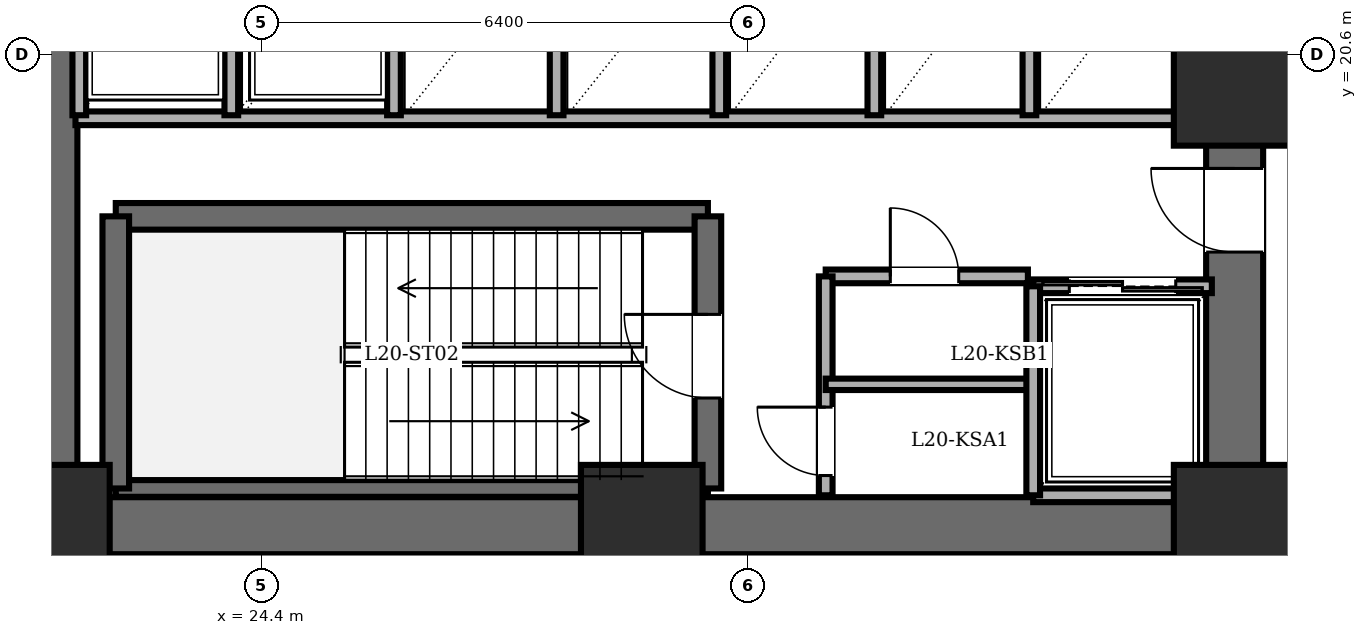
"""IFC4 building model, lengths in metres.
Left out: names, types, materials, properties, quantities, classifications, styles, units other than length and angle.
Written with IfcOpenShell. Run it as: python <this file> out.ifc"""

import sys

from ifc_helpers import new_model, si_unit, direction, frame, frame_2d, origin, origin_2d, place, context, subcontext, project, spatial, rectangle, extrude, element, fill, save


model = new_model("IFC4")
c1 = context("Model", 3, precision=1e-05, world=origin(), true_north=direction((0.0, 1.0)))
c2 = subcontext(c1, "Body", "Model", "MODEL_VIEW")
j1 = project(units=[si_unit("LENGTHUNIT", "METRE"), si_unit("PLANEANGLEUNIT", "RADIAN")], contexts=[c1])
p1 = place(None, origin())
s1 = spatial("IfcSite", under=j1, at=p1, CompositionType="ELEMENT")
p2 = place(p1, origin())
s2 = spatial("IfcBuilding", under=s1, at=p2, CompositionType="ELEMENT")
p3 = place(p2, frame((0.0, 0.0, 75.6)))
s3 = spatial("IfcBuildingStorey", under=s2, at=p3, CompositionType="ELEMENT", Elevation=75.6)
for number, where, z_axis, x_axis in (
    (1, (21.6, 14.4, 0.0), (0.0, 0.0, 1.0), (1.0, 0.0, 0.0)),
    (2, (29.4, 14.4, 0.0), (0.0, 0.0, 1.0), (1.0, 0.0, 0.0)),
    (3, (37.2, 14.4, 0.0), (0.0, 0.0, 1.0), (1.0, 0.0, 0.0)),
    (4, (37.2, 20.2, 0.0), (0.0, 0.0, 1.0), (1.0, 0.0, 0.0)),
):
    element("IfcColumn", number, at=place(p3, frame(where, z_axis=z_axis, x_axis=x_axis)), inside=s3, PredefinedType="COLUMN", context=c2, shape_type="SweptSolid", body=[
        extrude(rectangle(XDim=1.6, YDim=1.6, at=origin_2d()), origin(), (0.0, 0.0, 1.0), 5.6),
    ])
p4 = place(p3, frame((21.6, 14.4, 0.0), z_axis=(0.0, 0.0, 1.0), x_axis=(0.0, 1.0, 0.0)))
e5 = element("IfcWall", 5, at=p4, inside=s3, PredefinedType="SHEAR", context=c2, shape_type="SweptSolid", body=[
    extrude(rectangle(XDim=19.2, YDim=0.75, at=frame_2d((9.6, 0.0))), origin(), (0.0, 0.0, 1.0), 5.36),
])
p5 = place(p3, frame((37.2, 14.4, 0.0), z_axis=(0.0, 0.0, 1.0), x_axis=(-1.0, 0.0, 0.0)))
e6 = element("IfcWall", 6, at=p5, inside=s3, PredefinedType="SHEAR", context=c2, shape_type="SweptSolid", body=[
    extrude(rectangle(XDim=15.6, YDim=0.75, at=frame_2d((7.8, 0.0))), origin(), (0.0, 0.0, 1.0), 5.36),
])
p6 = place(p3, frame((37.2, 14.4, 0.0), z_axis=(0.0, 0.0, 1.0), x_axis=(0.0, 1.0, 0.0)))
e7 = element("IfcWall", 7, at=p6, inside=s3, PredefinedType="SHEAR", context=c2, shape_type="SweptSolid", body=[
    extrude(rectangle(XDim=19.2, YDim=0.75, at=frame_2d((9.6, 0.0))), origin(), (0.0, 0.0, 1.0), 5.36),
])
p7 = place(p6, frame((15.8, 0.0, 0.0)))
e8 = element("IfcOpeningElement", 8, at=p7, cuts=e7, PredefinedType="OPENING", context=c2, shape_type="SweptSolid", body=[
    extrude(rectangle(XDim=1.15, YDim=2.15, at=frame_2d((0.575, 1.075))), frame((0.0, 0.385, 0.0), z_axis=(0.0, -1.0, 0.0), x_axis=(1.0, 0.0, 0.0)), (0.0, 0.0, 1.0), 0.77),
])
p8 = place(p6, frame((3.6, 0.0, 0.0)))
e9 = element("IfcOpeningElement", 9, at=p8, cuts=e7, PredefinedType="OPENING", context=c2, shape_type="SweptSolid", body=[
    extrude(rectangle(XDim=1.1, YDim=2.15, at=frame_2d((0.55, 1.075))), frame((0.0, 0.385, 0.0), z_axis=(0.0, -1.0, 0.0), x_axis=(1.0, 0.0, 0.0)), (0.0, 0.0, 1.0), 0.77),
])
p9 = place(p6, frame((8.6, 0.0, 0.0)))
e10 = element("IfcOpeningElement", 10, at=p9, cuts=e7, PredefinedType="OPENING", context=c2, shape_type="SweptSolid", body=[
    extrude(rectangle(XDim=1.3, YDim=2.2, at=frame_2d((0.65, 1.1))), frame((0.0, 0.385, 0.0), z_axis=(0.0, -1.0, 0.0), x_axis=(1.0, 0.0, 0.0)), (0.0, 0.0, 1.0), 0.77),
])
p10 = place(p3, frame((22.48, 18.47, 0.0), z_axis=(0.0, 0.0, 1.0), x_axis=(1.0, 0.0, 0.0)))
e11 = element("IfcWall", 11, at=p10, inside=s3, PredefinedType="SOLIDWALL", context=c2, shape_type="SweptSolid", body=[
    extrude(rectangle(XDim=7.79, YDim=0.35, at=frame_2d((3.895, 0.0))), origin(), (0.0, 0.0, 1.0), 5.36),
])
p11 = place(p3, frame((22.48, 14.89, 0.0), z_axis=(0.0, 0.0, 1.0), x_axis=(1.0, 0.0, 0.0)))
e12 = element("IfcWall", 12, at=p11, inside=s3, PredefinedType="PARTITIONING", context=c2, shape_type="SweptSolid", body=[
    extrude(rectangle(XDim=7.79, YDim=0.22, at=frame_2d((3.895, 0.0))), origin(), (0.0, 0.0, 1.0), 5.36),
])
p12 = place(p3, frame((22.48, 14.89, 0.0), z_axis=(0.0, 0.0, 1.0), x_axis=(0.0, 1.0, 0.0)))
e13 = element("IfcWall", 13, at=p12, inside=s3, PredefinedType="SOLIDWALL", context=c2, shape_type="SweptSolid", body=[
    extrude(rectangle(XDim=3.58, YDim=0.35, at=frame_2d((1.79, 0.0))), origin(), (0.0, 0.0, 1.0), 5.36),
])
p13 = place(p3, frame((30.27, 14.89, 0.0), z_axis=(0.0, 0.0, 1.0), x_axis=(0.0, 1.0, 0.0)))
e14 = element("IfcWall", 14, at=p13, inside=s3, PredefinedType="SOLIDWALL", context=c2, shape_type="SweptSolid", body=[
    extrude(rectangle(XDim=3.58, YDim=0.35, at=frame_2d((1.79, 0.0))), origin(), (0.0, 0.0, 1.0), 5.36),
])
p14 = place(p13, frame((1.19, 0.0, 0.0)))
e15 = element("IfcOpeningElement", 15, at=p14, cuts=e14, PredefinedType="OPENING", context=c2, shape_type="SweptSolid", body=[
    extrude(rectangle(XDim=1.1, YDim=2.15, at=frame_2d((0.55, 1.075))), frame((0.0, 0.185, 0.0), z_axis=(0.0, -1.0, 0.0), x_axis=(1.0, 0.0, 0.0)), (0.0, 0.0, 1.0), 0.37),
])
p15 = place(p3, frame((21.95, 19.76, 0.0), z_axis=(0.0, 0.0, 1.0), x_axis=(1.0, 0.0, 0.0)))
e16 = element("IfcWall", 16, at=p15, inside=s3, PredefinedType="PARTITIONING", context=c2, shape_type="SweptSolid", body=[
    extrude(rectangle(XDim=14.87, YDim=0.18, at=frame_2d((7.435, 0.0))), origin(), (0.0, 0.0, 1.0), 5.36),
])
p16 = place(p3, frame((31.82, 17.68, 0.0), z_axis=(0.0, 0.0, 1.0), x_axis=(1.0, 0.0, 0.0)))
e17 = element("IfcWall", 17, at=p16, inside=s3, PredefinedType="PARTITIONING", context=c2, shape_type="SweptSolid", body=[
    extrude(rectangle(XDim=2.66, YDim=0.18, at=frame_2d((1.33, 0.0))), origin(), (0.0, 0.0, 1.0), 5.36),
])
p17 = place(p16, frame((0.85, 0.0, 0.0)))
e18 = element("IfcOpeningElement", 18, at=p17, cuts=e17, PredefinedType="OPENING", context=c2, shape_type="SweptSolid", body=[
    extrude(rectangle(XDim=0.9, YDim=2.05, at=frame_2d((0.45, 1.025))), frame((0.0, 0.1, 0.0), z_axis=(0.0, -1.0, 0.0), x_axis=(1.0, 0.0, 0.0)), (0.0, 0.0, 1.0), 0.2),
])
p18 = place(p3, frame((31.82, 14.8, 0.0), z_axis=(0.0, 0.0, 1.0), x_axis=(0.0, 1.0, 0.0)))
e19 = element("IfcWall", 19, at=p18, inside=s3, PredefinedType="PARTITIONING", context=c2, shape_type="SweptSolid", body=[
    extrude(rectangle(XDim=2.88, YDim=0.18, at=frame_2d((1.44, 0.0))), origin(), (0.0, 0.0, 1.0), 5.36),
])
p19 = place(p18, frame((0.26, 0.0, 0.0)))
e20 = element("IfcOpeningElement", 20, at=p19, cuts=e19, PredefinedType="OPENING", context=c2, shape_type="SweptSolid", body=[
    extrude(rectangle(XDim=0.9, YDim=2.05, at=frame_2d((0.45, 1.025))), frame((0.0, 0.1, 0.0), z_axis=(0.0, -1.0, 0.0), x_axis=(1.0, 0.0, 0.0)), (0.0, 0.0, 1.0), 0.2),
])
p20 = place(p3, frame((31.82, 16.26, 0.0), z_axis=(0.0, 0.0, 1.0), x_axis=(1.0, 0.0, 0.0)))
e21 = element("IfcWall", 21, at=p20, inside=s3, PredefinedType="PARTITIONING", context=c2, shape_type="SweptSolid", body=[
    extrude(rectangle(XDim=2.66, YDim=0.15, at=frame_2d((1.33, 0.0))), origin(), (0.0, 0.0, 1.0), 5.36),
])
p21 = place(p3, frame((34.55, 17.55, 0.0), z_axis=(0.0, 0.0, 1.0), x_axis=(1.0, 0.0, 0.0)))
e22 = element("IfcWall", 22, at=p21, inside=s3, PredefinedType="PARTITIONING", context=c2, shape_type="SweptSolid", body=[
    extrude(rectangle(XDim=2.35, YDim=0.18, at=frame_2d((1.175, 0.0))), origin(), (0.0, 0.0, 1.0), 5.36),
])
p22 = place(p21, frame((0.475, 0.0, 0.0)))
e23 = element("IfcOpeningElement", 23, at=p22, cuts=e22, PredefinedType="OPENING", context=c2, shape_type="SweptSolid", body=[
    extrude(rectangle(XDim=1.4, YDim=2.3, at=frame_2d((0.7, 1.15))), frame((0.0, 0.1, 0.0), z_axis=(0.0, -1.0, 0.0), x_axis=(1.0, 0.0, 0.0)), (0.0, 0.0, 1.0), 0.2),
])
p23 = place(p3, frame((36.9, 14.8, 0.0), z_axis=(0.0, 0.0, 1.0), x_axis=(-1.0, 0.0, 0.0)))
e24 = element("IfcWall", 24, at=p23, inside=s3, PredefinedType="PARTITIONING", context=c2, shape_type="SweptSolid", body=[
    extrude(rectangle(XDim=2.35, YDim=0.18, at=frame_2d((1.175, 0.0))), origin(), (0.0, 0.0, 1.0), 2.942),
])
p24 = place(p3, frame((34.55, 17.55, 0.0), z_axis=(0.0, 0.0, 1.0), x_axis=(0.0, -1.0, 0.0)))
e25 = element("IfcWall", 25, at=p24, inside=s3, PredefinedType="PARTITIONING", context=c2, shape_type="SweptSolid", body=[
    extrude(rectangle(XDim=2.75, YDim=0.18, at=frame_2d((1.375, 0.0))), origin(), (0.0, 0.0, 1.0), 5.36),
])
for number, where, z_axis, x_axis in (
    (26, (24.0, 19.8, 0.0), (0.0, 0.0, 1.0), (0.0, 1.0, 0.0)),
    (27, (22.0, 22.3, 0.0), (0.0, 0.0, 1.0), (0.0, -1.0, 0.0)),
    (28, (26.14, 19.8, 0.0), (0.0, 0.0, 1.0), (0.0, 1.0, 0.0)),
    (29, (28.28, 19.8, 0.0), (0.0, 0.0, 1.0), (0.0, 1.0, 0.0)),
    (30, (30.42, 19.8, 0.0), (0.0, 0.0, 1.0), (0.0, 1.0, 0.0)),
    (31, (32.46, 19.8, 0.0), (0.0, 0.0, 1.0), (0.0, 1.0, 0.0)),
    (32, (34.5, 19.8, 0.0), (0.0, 0.0, 1.0), (0.0, 1.0, 0.0)),
    (33, (36.54, 19.8, 0.0), (0.0, 0.0, 1.0), (0.0, 1.0, 0.0)),
):
    element("IfcWall", number, at=place(p3, frame(where, z_axis=z_axis, x_axis=x_axis)), inside=s3, PredefinedType="PARTITIONING", context=c2, shape_type="SweptSolid", body=[
        extrude(rectangle(XDim=2.5, YDim=0.18, at=frame_2d((1.25, 0.0))), origin(), (0.0, 0.0, 1.0), 5.36),
    ])
p25 = place(p14, origin())
e34 = element("IfcDoor", 34, at=p25, inside=s3, OperationType="SINGLE_SWING_RIGHT", PredefinedType="DOOR", context=c2, shape_type="SweptSolid", body=[
    extrude(rectangle(XDim=1.1, YDim=2.15, at=frame_2d((0.55, 1.075))), frame((0.0, 0.025, 0.0), z_axis=(0.0, -1.0, 0.0), x_axis=(1.0, 0.0, 0.0)), (0.0, 0.0, 1.0), 0.05),
])
fill(e15, e34)
p26 = place(p8, origin())
e35 = element("IfcDoor", 35, at=p26, inside=s3, OperationType="SINGLE_SWING_RIGHT", PredefinedType="DOOR", context=c2, shape_type="SweptSolid", body=[
    extrude(rectangle(XDim=1.1, YDim=2.15, at=frame_2d((0.55, 1.075))), frame((0.0, 0.025, 0.0), z_axis=(0.0, -1.0, 0.0), x_axis=(1.0, 0.0, 0.0)), (0.0, 0.0, 1.0), 0.05),
])
fill(e9, e35)
p27 = place(p17, origin())
e36 = element("IfcDoor", 36, at=p27, inside=s3, OperationType="SINGLE_SWING_LEFT", PredefinedType="DOOR", context=c2, shape_type="SweptSolid", body=[
    extrude(rectangle(XDim=0.9, YDim=2.05, at=frame_2d((0.45, 1.025))), frame((0.0, 0.025, 0.0), z_axis=(0.0, -1.0, 0.0), x_axis=(1.0, 0.0, 0.0)), (0.0, 0.0, 1.0), 0.05),
])
fill(e18, e36)
p28 = place(p19, origin())
e37 = element("IfcDoor", 37, at=p28, inside=s3, OperationType="SINGLE_SWING_RIGHT", PredefinedType="DOOR", context=c2, shape_type="SweptSolid", body=[
    extrude(rectangle(XDim=0.9, YDim=2.05, at=frame_2d((0.45, 1.025))), frame((0.0, 0.025, 0.0), z_axis=(0.0, -1.0, 0.0), x_axis=(1.0, 0.0, 0.0)), (0.0, 0.0, 1.0), 0.05),
])
fill(e20, e37)
p29 = place(p22, origin())
e38 = element("IfcDoor", 38, at=p29, inside=s3, OperationType="DOUBLE_DOOR_SLIDING", PredefinedType="DOOR", context=c2, shape_type="SweptSolid", body=[
    extrude(rectangle(XDim=1.4, YDim=2.3, at=frame_2d((0.7, 1.15))), frame((0.0, 0.025, 0.0), z_axis=(0.0, -1.0, 0.0), x_axis=(1.0, 0.0, 0.0)), (0.0, 0.0, 1.0), 0.05),
])
fill(e23, e38)
save(model, sys.argv[1])
